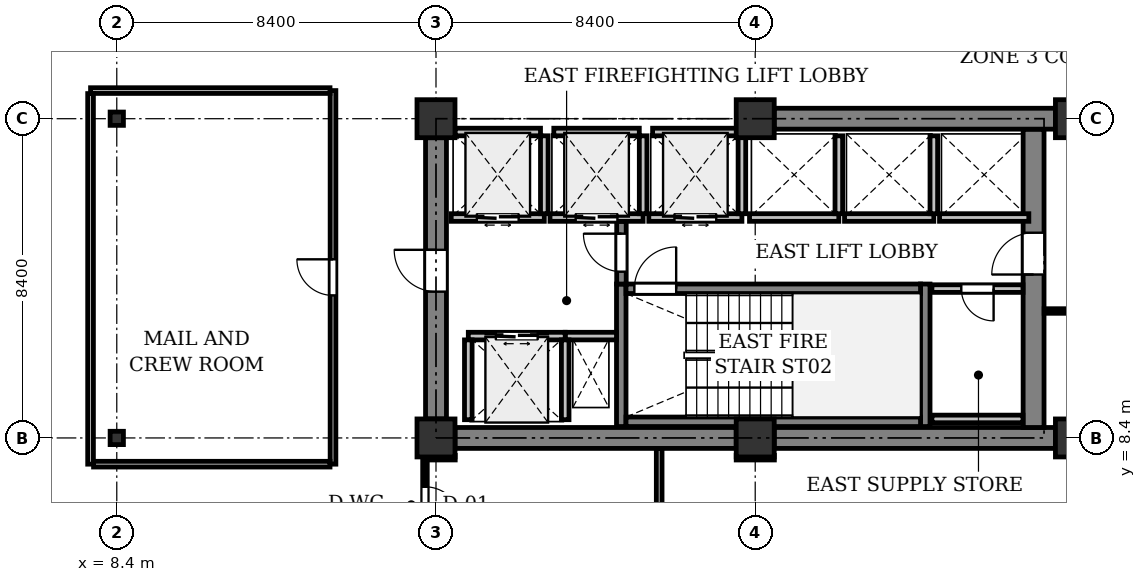
"""IFC4 building model, lengths in metres.
Left out: names, types, materials, properties, quantities, classifications, styles, units other than length and angle.
Written with IfcOpenShell. Run it as: python <this file> out.ifc"""

import sys

from ifc_helpers import new_model, si_unit, direction, frame, frame_2d, origin, origin_2d, place, context, subcontext, project, spatial, rectangle, i_section, extrude, element, fill, save


model = new_model("IFC4")
c1 = context("Model", 3, precision=1e-05, world=origin(), true_north=direction((0.0, 1.0)))
c2 = subcontext(c1, "Body", "Model", "MODEL_VIEW")
j1 = project(units=[si_unit("LENGTHUNIT", "METRE"), si_unit("PLANEANGLEUNIT", "RADIAN")], contexts=[c1])
p1 = place(None, origin())
s1 = spatial("IfcSite", under=j1, at=p1, CompositionType="ELEMENT")
p2 = place(p1, origin())
s2 = spatial("IfcBuilding", under=s1, at=p2, CompositionType="ELEMENT")
p3 = place(p2, frame((0.0, 0.0, 208.3)))
s3 = spatial("IfcBuildingStorey", under=s2, at=p3, CompositionType="ELEMENT", Elevation=208.3)
for number, where, z_axis, x_axis in (
    (1, (8.4, 8.4, 0.0), (0.0, 0.0, 1.0), (1.0, 0.0, 0.0)),
    (2, (8.4, 16.8, 0.0), (0.0, 0.0, 1.0), (1.0, 0.0, 0.0)),
):
    element("IfcColumn", number, at=place(p3, frame(where, z_axis=z_axis, x_axis=x_axis)), inside=s3, PredefinedType="COLUMN", context=c2, shape_type="SweptSolid", body=[
        extrude(i_section(OverallWidth=0.35, OverallDepth=0.35, WebThickness=0.02, FlangeThickness=0.032, at=origin_2d()), origin(), (0.0, 0.0, 1.0), 4.1),
    ])
for number, where, z_axis, x_axis in (
    (3, (16.8, 8.4, 0.0), (0.0, 0.0, 1.0), (1.0, 0.0, 0.0)),
    (4, (16.8, 16.8, 0.0), (0.0, 0.0, 1.0), (1.0, 0.0, 0.0)),
    (5, (25.2, 8.4, 0.0), (0.0, 0.0, 1.0), (1.0, 0.0, 0.0)),
    (6, (25.2, 16.8, 0.0), (0.0, 0.0, 1.0), (1.0, 0.0, 0.0)),
    (7, (33.6, 8.4, 0.0), (0.0, 0.0, 1.0), (1.0, 0.0, 0.0)),
    (8, (33.6, 16.8, 0.0), (0.0, 0.0, 1.0), (1.0, 0.0, 0.0)),
):
    element("IfcColumn", number, at=place(p3, frame(where, z_axis=z_axis, x_axis=x_axis)), inside=s3, PredefinedType="COLUMN", context=c2, shape_type="SweptSolid", body=[
        extrude(rectangle(XDim=1.0, YDim=1.0, at=origin_2d()), origin(), (0.0, 0.0, 1.0), 4.1),
    ])
p4 = place(p3, frame((17.3, 8.4, 0.0), z_axis=(0.0, 0.0, 1.0), x_axis=(1.0, 0.0, 0.0)))
e9 = element("IfcWall", 9, at=p4, inside=s3, PredefinedType="SHEAR", context=c2, shape_type="SweptSolid", body=[
    extrude(rectangle(XDim=7.4, YDim=0.55, at=frame_2d((3.7, 0.0))), origin(), (0.0, 0.0, 1.0), 3.825),
])
p5 = place(p3, frame((25.7, 8.4, 0.0), z_axis=(0.0, 0.0, 1.0), x_axis=(1.0, 0.0, 0.0)))
e10 = element("IfcWall", 10, at=p5, inside=s3, PredefinedType="SHEAR", context=c2, shape_type="SweptSolid", body=[
    extrude(rectangle(XDim=7.4, YDim=0.55, at=frame_2d((3.7, 0.0))), origin(), (0.0, 0.0, 1.0), 3.825),
])
p6 = place(p3, frame((32.525, 8.675, 0.0), z_axis=(0.0, 0.0, 1.0), x_axis=(0.0, 1.0, 0.0)))
e11 = element("IfcWall", 11, at=p6, inside=s3, PredefinedType="SHEAR", context=c2, shape_type="SweptSolid", body=[
    extrude(rectangle(XDim=7.85, YDim=0.55, at=frame_2d((3.925, 0.0))), origin(), (0.0, 0.0, 1.0), 3.825),
])
p7 = place(p6, frame((4.025, 0.0, 0.0)))
e12 = element("IfcOpeningElement", 12, at=p7, cuts=e11, PredefinedType="OPENING", context=c2, shape_type="SweptSolid", body=[
    extrude(rectangle(XDim=1.1, YDim=2.15, at=frame_2d((0.55, 1.075))), frame((0.0, 0.285, 0.0), z_axis=(0.0, -1.0, 0.0), x_axis=(1.0, 0.0, 0.0)), (0.0, 0.0, 1.0), 0.57),
])
p8 = place(p3, frame((16.8, 8.9, 0.0), z_axis=(0.0, 0.0, 1.0), x_axis=(0.0, 1.0, 0.0)))
e13 = element("IfcWall", 13, at=p8, inside=s3, PredefinedType="SHEAR", context=c2, shape_type="SweptSolid", body=[
    extrude(rectangle(XDim=7.4, YDim=0.55, at=frame_2d((3.7, 0.0))), origin(), (0.0, 0.0, 1.0), 3.825),
])
p9 = place(p8, frame((3.35, 0.0, 0.0)))
e14 = element("IfcOpeningElement", 14, at=p9, cuts=e13, PredefinedType="OPENING", context=c2, shape_type="SweptSolid", body=[
    extrude(rectangle(XDim=1.1, YDim=2.15, at=frame_2d((0.55, 1.075))), frame((0.0, 0.285, 0.0), z_axis=(0.0, -1.0, 0.0), x_axis=(1.0, 0.0, 0.0)), (0.0, 0.0, 1.0), 0.57),
])
p10 = place(p3, frame((25.7, 16.8, 0.0), z_axis=(0.0, 0.0, 1.0), x_axis=(1.0, 0.0, 0.0)))
e15 = element("IfcWall", 15, at=p10, inside=s3, PredefinedType="SHEAR", context=c2, shape_type="SweptSolid", body=[
    extrude(rectangle(XDim=7.4, YDim=0.55, at=frame_2d((3.7, 0.0))), origin(), (0.0, 0.0, 1.0), 3.825),
])
for number, where, z_axis, x_axis in (
    (16, (21.675, 8.7, 0.0), (0.0, 0.0, 1.0), (0.0, 1.0, 0.0)),
    (17, (29.675, 8.7, 0.0), (0.0, 0.0, 1.0), (0.0, 1.0, 0.0)),
):
    element("IfcWall", number, at=place(p3, frame(where, z_axis=z_axis, x_axis=x_axis)), inside=s3, PredefinedType="SHEAR", context=c2, shape_type="SweptSolid", body=[
        extrude(rectangle(XDim=3.75, YDim=0.25, at=frame_2d((1.875, 0.0))), origin(), (0.0, 0.0, 1.0), 3.825),
    ])
p11 = place(p3, frame((21.8, 8.825, 0.0), z_axis=(0.0, 0.0, 1.0), x_axis=(1.0, 0.0, 0.0)))
e18 = element("IfcWall", 18, at=p11, inside=s3, PredefinedType="SHEAR", context=c2, shape_type="SweptSolid", body=[
    extrude(rectangle(XDim=7.75, YDim=0.25, at=frame_2d((3.875, 0.0))), origin(), (0.0, 0.0, 1.0), 3.825),
])
p12 = place(p3, frame((21.8, 12.325, 0.0), z_axis=(0.0, 0.0, 1.0), x_axis=(1.0, 0.0, 0.0)))
e19 = element("IfcWall", 19, at=p12, inside=s3, PredefinedType="SHEAR", context=c2, shape_type="SweptSolid", body=[
    extrude(rectangle(XDim=7.75, YDim=0.25, at=frame_2d((3.875, 0.0))), origin(), (0.0, 0.0, 1.0), 3.825),
])
p13 = place(p12, frame((0.22, 0.0, 0.0)))
e20 = element("IfcOpeningElement", 20, at=p13, cuts=e19, PredefinedType="OPENING", context=c2, shape_type="SweptSolid", body=[
    extrude(rectangle(XDim=1.1, YDim=2.15, at=frame_2d((0.55, 1.075))), frame((0.0, 0.135, 0.0), z_axis=(0.0, -1.0, 0.0), x_axis=(1.0, 0.0, 0.0)), (0.0, 0.0, 1.0), 0.27),
])
p14 = place(p3, frame((20.2, 11.08, 0.0), z_axis=(0.0, 0.0, 1.0), x_axis=(1.0, 0.0, 0.0)))
e21 = element("IfcWall", 21, at=p14, inside=s3, PredefinedType="PARTITIONING", context=c2, shape_type="SweptSolid", body=[
    extrude(rectangle(XDim=1.35, YDim=0.2, at=frame_2d((0.675, 0.0))), origin(), (0.0, 0.0, 1.0), 3.825),
])
p15 = place(p3, frame((21.68, 12.45, 0.0), z_axis=(0.0, 0.0, 1.0), x_axis=(0.0, 1.0, 0.0)))
e22 = element("IfcWall", 22, at=p15, inside=s3, PredefinedType="SHEAR", context=c2, shape_type="SweptSolid", body=[
    extrude(rectangle(XDim=1.65, YDim=0.25, at=frame_2d((0.825, 0.0))), origin(), (0.0, 0.0, 1.0), 3.825),
])
p16 = place(p15, frame((0.325, 0.0, 0.0)))
e23 = element("IfcOpeningElement", 23, at=p16, cuts=e22, PredefinedType="OPENING", context=c2, shape_type="SweptSolid", body=[
    extrude(rectangle(XDim=1.0, YDim=2.15, at=frame_2d((0.5, 1.075))), frame((0.0, 0.135, 0.0), z_axis=(0.0, -1.0, 0.0), x_axis=(1.0, 0.0, 0.0)), (0.0, 0.0, 1.0), 0.27),
])
p17 = place(p3, frame((17.65, 11.08, 0.0), z_axis=(0.0, 0.0, 1.0), x_axis=(1.0, 0.0, 0.0)))
e24 = element("IfcWall", 24, at=p17, inside=s3, PredefinedType="PARTITIONING", context=c2, shape_type="SweptSolid", body=[
    extrude(rectangle(XDim=2.55, YDim=0.2, at=frame_2d((1.275, 0.0))), origin(), (0.0, 0.0, 1.0), 3.825),
])
p18 = place(p17, frame((0.725, 0.0, 0.0)))
e25 = element("IfcOpeningElement", 25, at=p18, cuts=e24, PredefinedType="OPENING", context=c2, shape_type="SweptSolid", body=[
    extrude(rectangle(XDim=1.1, YDim=2.2, at=frame_2d((0.55, 1.1))), frame((0.0, 0.11, 0.0), z_axis=(0.0, -1.0, 0.0), x_axis=(1.0, 0.0, 0.0)), (0.0, 0.0, 1.0), 0.22),
])
for number, where, z_axis, x_axis in (
    (26, (20.2, 8.88, 0.0), (0.0, 0.0, 1.0), (0.0, 1.0, 0.0)),
    (27, (17.65, 8.88, 0.0), (0.0, 0.0, 1.0), (0.0, 1.0, 0.0)),
):
    element("IfcWall", number, at=place(p3, frame(where, z_axis=z_axis, x_axis=x_axis)), inside=s3, PredefinedType="PARTITIONING", context=c2, shape_type="SweptSolid", body=[
        extrude(rectangle(XDim=2.1, YDim=0.2, at=frame_2d((1.05, 0.0))), origin(), (0.0, 0.0, 1.0), 3.825),
    ])
p19 = place(p3, frame((17.2, 14.2, 0.0), z_axis=(0.0, 0.0, 1.0), x_axis=(1.0, 0.0, 0.0)))
e28 = element("IfcWall", 28, at=p19, inside=s3, PredefinedType="PARTITIONING", context=c2, shape_type="SweptSolid", body=[
    extrude(rectangle(XDim=2.45, YDim=0.2, at=frame_2d((1.225, 0.0))), origin(), (0.0, 0.0, 1.0), 3.825),
])
p20 = place(p19, frame((0.675, 0.0, 0.0)))
e29 = element("IfcOpeningElement", 29, at=p20, cuts=e28, PredefinedType="OPENING", context=c2, shape_type="SweptSolid", body=[
    extrude(rectangle(XDim=1.1, YDim=2.2, at=frame_2d((0.55, 1.1))), frame((0.0, 0.11, 0.0), z_axis=(0.0, -1.0, 0.0), x_axis=(1.0, 0.0, 0.0)), (0.0, 0.0, 1.0), 0.22),
])
p21 = place(p3, frame((19.65, 14.3, 0.0), z_axis=(0.0, 0.0, 1.0), x_axis=(0.0, 1.0, 0.0)))
e30 = element("IfcWall", 30, at=p21, inside=s3, PredefinedType="PARTITIONING", context=c2, shape_type="SweptSolid", body=[
    extrude(rectangle(XDim=2.05, YDim=0.2, at=frame_2d((1.025, 0.0))), origin(), (0.0, 0.0, 1.0), 3.825),
])
p22 = place(p3, frame((17.3, 16.45, 0.0), z_axis=(0.0, 0.0, 1.0), x_axis=(1.0, 0.0, 0.0)))
e31 = element("IfcWall", 31, at=p22, inside=s3, PredefinedType="PARTITIONING", context=c2, shape_type="SweptSolid", body=[
    extrude(rectangle(XDim=2.25, YDim=0.2, at=frame_2d((1.125, 0.0))), origin(), (0.0, 0.0, 1.0), 3.825),
])
p23 = place(p3, frame((19.8, 14.2, 0.0), z_axis=(0.0, 0.0, 1.0), x_axis=(1.0, 0.0, 0.0)))
e32 = element("IfcWall", 32, at=p23, inside=s3, PredefinedType="PARTITIONING", context=c2, shape_type="SweptSolid", body=[
    extrude(rectangle(XDim=2.45, YDim=0.2, at=frame_2d((1.225, 0.0))), origin(), (0.0, 0.0, 1.0), 3.825),
])
p24 = place(p23, frame((0.675, 0.0, 0.0)))
e33 = element("IfcOpeningElement", 33, at=p24, cuts=e32, PredefinedType="OPENING", context=c2, shape_type="SweptSolid", body=[
    extrude(rectangle(XDim=1.1, YDim=2.2, at=frame_2d((0.55, 1.1))), frame((0.0, 0.11, 0.0), z_axis=(0.0, -1.0, 0.0), x_axis=(1.0, 0.0, 0.0)), (0.0, 0.0, 1.0), 0.22),
])
p25 = place(p3, frame((22.25, 14.3, 0.0), z_axis=(0.0, 0.0, 1.0), x_axis=(0.0, 1.0, 0.0)))
e34 = element("IfcWall", 34, at=p25, inside=s3, PredefinedType="PARTITIONING", context=c2, shape_type="SweptSolid", body=[
    extrude(rectangle(XDim=2.05, YDim=0.2, at=frame_2d((1.025, 0.0))), origin(), (0.0, 0.0, 1.0), 3.825),
])
p26 = place(p3, frame((19.9, 16.45, 0.0), z_axis=(0.0, 0.0, 1.0), x_axis=(1.0, 0.0, 0.0)))
e35 = element("IfcWall", 35, at=p26, inside=s3, PredefinedType="PARTITIONING", context=c2, shape_type="SweptSolid", body=[
    extrude(rectangle(XDim=2.25, YDim=0.2, at=frame_2d((1.125, 0.0))), origin(), (0.0, 0.0, 1.0), 3.825),
])
p27 = place(p3, frame((22.4, 14.2, 0.0), z_axis=(0.0, 0.0, 1.0), x_axis=(1.0, 0.0, 0.0)))
e36 = element("IfcWall", 36, at=p27, inside=s3, PredefinedType="PARTITIONING", context=c2, shape_type="SweptSolid", body=[
    extrude(rectangle(XDim=2.45, YDim=0.2, at=frame_2d((1.225, 0.0))), origin(), (0.0, 0.0, 1.0), 3.825),
])
p28 = place(p27, frame((0.675, 0.0, 0.0)))
e37 = element("IfcOpeningElement", 37, at=p28, cuts=e36, PredefinedType="OPENING", context=c2, shape_type="SweptSolid", body=[
    extrude(rectangle(XDim=1.1, YDim=2.2, at=frame_2d((0.55, 1.1))), frame((0.0, 0.11, 0.0), z_axis=(0.0, -1.0, 0.0), x_axis=(1.0, 0.0, 0.0)), (0.0, 0.0, 1.0), 0.22),
])
p29 = place(p3, frame((24.85, 14.3, 0.0), z_axis=(0.0, 0.0, 1.0), x_axis=(0.0, 1.0, 0.0)))
e38 = element("IfcWall", 38, at=p29, inside=s3, PredefinedType="PARTITIONING", context=c2, shape_type="SweptSolid", body=[
    extrude(rectangle(XDim=2.05, YDim=0.2, at=frame_2d((1.025, 0.0))), origin(), (0.0, 0.0, 1.0), 3.825),
])
p30 = place(p3, frame((22.5, 16.45, 0.0), z_axis=(0.0, 0.0, 1.0), x_axis=(1.0, 0.0, 0.0)))
e39 = element("IfcWall", 39, at=p30, inside=s3, PredefinedType="PARTITIONING", context=c2, shape_type="SweptSolid", body=[
    extrude(rectangle(XDim=2.25, YDim=0.2, at=frame_2d((1.125, 0.0))), origin(), (0.0, 0.0, 1.0), 3.825),
])
p31 = place(p3, frame((25.05, 14.2, 0.0), z_axis=(0.0, 0.0, 1.0), x_axis=(1.0, 0.0, 0.0)))
e40 = element("IfcWall", 40, at=p31, inside=s3, PredefinedType="PARTITIONING", context=c2, shape_type="SweptSolid", body=[
    extrude(rectangle(XDim=2.35, YDim=0.2, at=frame_2d((1.175, 0.0))), origin(), (0.0, 0.0, 1.0), 3.825),
])
p32 = place(p3, frame((27.4, 14.3, 0.0), z_axis=(0.0, 0.0, 1.0), x_axis=(0.0, 1.0, 0.0)))
e41 = element("IfcWall", 41, at=p32, inside=s3, PredefinedType="PARTITIONING", context=c2, shape_type="SweptSolid", body=[
    extrude(rectangle(XDim=2.05, YDim=0.2, at=frame_2d((1.025, 0.0))), origin(), (0.0, 0.0, 1.0), 3.825),
])
p33 = place(p3, frame((27.55, 14.2, 0.0), z_axis=(0.0, 0.0, 1.0), x_axis=(1.0, 0.0, 0.0)))
e42 = element("IfcWall", 42, at=p33, inside=s3, PredefinedType="PARTITIONING", context=c2, shape_type="SweptSolid", body=[
    extrude(rectangle(XDim=2.35, YDim=0.2, at=frame_2d((1.175, 0.0))), origin(), (0.0, 0.0, 1.0), 3.825),
])
p34 = place(p3, frame((29.9, 14.3, 0.0), z_axis=(0.0, 0.0, 1.0), x_axis=(0.0, 1.0, 0.0)))
e43 = element("IfcWall", 43, at=p34, inside=s3, PredefinedType="PARTITIONING", context=c2, shape_type="SweptSolid", body=[
    extrude(rectangle(XDim=2.05, YDim=0.2, at=frame_2d((1.025, 0.0))), origin(), (0.0, 0.0, 1.0), 3.825),
])
p35 = place(p3, frame((30.05, 14.2, 0.0), z_axis=(0.0, 0.0, 1.0), x_axis=(1.0, 0.0, 0.0)))
e44 = element("IfcWall", 44, at=p35, inside=s3, PredefinedType="PARTITIONING", context=c2, shape_type="SweptSolid", body=[
    extrude(rectangle(XDim=2.35, YDim=0.2, at=frame_2d((1.175, 0.0))), origin(), (0.0, 0.0, 1.0), 3.825),
])
p36 = place(p3, frame((32.246, 12.33, 0.0), z_axis=(0.0, 0.0, 1.0), x_axis=(-1.0, 0.0, 0.0)))
e45 = element("IfcWall", 45, at=p36, inside=s3, PredefinedType="PARTITIONING", context=c2, shape_type="SweptSolid", body=[
    extrude(rectangle(XDim=2.396, YDim=0.2, at=frame_2d((1.198, 0.0))), origin(), (0.0, 0.0, 1.0), 3.825),
])
p37 = place(p36, frame((0.773, 0.0, 0.0)))
e46 = element("IfcOpeningElement", 46, at=p37, cuts=e45, PredefinedType="OPENING", context=c2, shape_type="SweptSolid", body=[
    extrude(rectangle(XDim=0.85, YDim=2.15, at=frame_2d((0.425, 1.075))), frame((0.0, 0.11, 0.0), z_axis=(0.0, -1.0, 0.0), x_axis=(1.0, 0.0, 0.0)), (0.0, 0.0, 1.0), 0.22),
])
p38 = place(p3, frame((29.85, 8.9, 0.0), z_axis=(0.0, 0.0, 1.0), x_axis=(1.0, 0.0, 0.0)))
e47 = element("IfcWall", 47, at=p38, inside=s3, PredefinedType="PARTITIONING", context=c2, shape_type="SweptSolid", body=[
    extrude(rectangle(XDim=2.396, YDim=0.2, at=frame_2d((1.198, 0.0))), origin(), (0.0, 0.0, 1.0), 3.825),
])
p39 = place(p3, frame((22.673, 0.169, 0.0), z_axis=(0.0, 0.0, 1.0), x_axis=(0.0, 1.0, 0.0)))
e48 = element("IfcWall", 48, at=p39, inside=s3, PredefinedType="PARTITIONING", context=c2, shape_type="SweptSolid", body=[
    extrude(rectangle(XDim=7.952, YDim=0.15, at=frame_2d((3.976, 0.0))), origin(), (0.0, 0.0, 1.0), 3.825),
])
p40 = place(p3, frame((17.306, 7.881, 0.0), z_axis=(0.0, 0.0, 1.0), x_axis=(-0.999999247244, -0.001226992941, 0.0)))
e49 = element("IfcWall", 49, at=p40, inside=s3, PredefinedType="PARTITIONING", context=c2, shape_type="SweptSolid", body=[
    extrude(rectangle(XDim=0.796, YDim=0.12, at=frame_2d((0.398, 0.0))), origin(), (0.0, 0.0, 1.0), 3.371),
])
p41 = place(p3, frame((16.51, 7.88, 0.0), z_axis=(0.0, 0.0, 1.0), x_axis=(0.0, -1.0, 0.0)))
e50 = element("IfcWall", 50, at=p41, inside=s3, PredefinedType="PARTITIONING", context=c2, shape_type="SweptSolid", body=[
    extrude(rectangle(XDim=2.48, YDim=0.12, at=frame_2d((1.24, 0.0))), origin(), (0.0, 0.0, 1.0), 3.825),
])
p42 = place(p41, frame((0.765, 0.0, 0.0)))
e51 = element("IfcOpeningElement", 51, at=p42, cuts=e50, PredefinedType="OPENING", context=c2, shape_type="SweptSolid", body=[
    extrude(rectangle(XDim=0.95, YDim=2.15, at=frame_2d((0.475, 1.075))), frame((0.0, 0.07, 0.0), z_axis=(0.0, -1.0, 0.0), x_axis=(1.0, 0.0, 0.0)), (0.0, 0.0, 1.0), 0.14),
])
p43 = place(p3, frame((14.09, 7.71, 0.0), z_axis=(0.0, 0.0, 1.0), x_axis=(0.0, 1.0, 0.0)))
e52 = element("IfcWall", 52, at=p43, inside=s3, PredefinedType="PARTITIONING", context=c2, shape_type="SweptSolid", body=[
    extrude(rectangle(XDim=9.83, YDim=0.15, at=frame_2d((4.915, 0.0))), origin(), (0.0, 0.0, 1.0), 3.365),
])
p44 = place(p43, frame((4.44, 0.0, 0.0)))
e53 = element("IfcOpeningElement", 53, at=p44, cuts=e52, PredefinedType="OPENING", context=c2, shape_type="SweptSolid", body=[
    extrude(rectangle(XDim=0.95, YDim=2.15, at=frame_2d((0.475, 1.075))), frame((0.0, 0.085, 0.0), z_axis=(0.0, -1.0, 0.0), x_axis=(1.0, 0.0, 0.0)), (0.0, 0.0, 1.0), 0.17),
])
p45 = place(p3, frame((14.011, 17.54, 0.0), z_axis=(0.0, 0.0, 1.0), x_axis=(-1.0, 0.0, 0.0)))
e54 = element("IfcWall", 54, at=p45, inside=s3, PredefinedType="PARTITIONING", context=c2, shape_type="SweptSolid", body=[
    extrude(rectangle(XDim=6.301, YDim=0.15, at=frame_2d((3.15, 0.0))), origin(), (0.0, 0.0, 1.0), 3.371),
])
p46 = place(p3, frame((7.71, 17.461, 0.0), z_axis=(0.0, 0.0, 1.0), x_axis=(0.0, -1.0, 0.0)))
e55 = element("IfcWall", 55, at=p46, inside=s3, PredefinedType="PARTITIONING", context=c2, shape_type="SweptSolid", body=[
    extrude(rectangle(XDim=9.751, YDim=0.15, at=frame_2d((4.875, 0.0))), origin(), (0.0, 0.0, 1.0), 3.213),
])
p47 = place(p3, frame((7.789, 7.71, 0.0), z_axis=(0.0, 0.0, 1.0), x_axis=(1.0, 0.0, 0.0)))
e56 = element("IfcWall", 56, at=p47, inside=s3, PredefinedType="PARTITIONING", context=c2, shape_type="SweptSolid", body=[
    extrude(rectangle(XDim=6.222, YDim=0.15, at=frame_2d((3.111, 0.0))), origin(), (0.0, 0.0, 1.0), 3.371),
])
p48 = place(p3, frame((34.261, 11.74, 0.0), z_axis=(0.0, 0.0, 1.0), x_axis=(-1.0, 0.0, 0.0)))
e57 = element("IfcWall", 57, at=p48, inside=s3, PredefinedType="PARTITIONING", context=c2, shape_type="SweptSolid", body=[
    extrude(rectangle(XDim=1.457, YDim=0.12, at=frame_2d((0.729, 0.0))), origin(), (0.0, 0.0, 1.0), 3.371),
])
p49 = place(p3, frame((25.704, 7.88, 0.0), z_axis=(0.0, 0.0, 1.0), x_axis=(-0.999999881717, -0.000486381265, 0.0)))
e58 = element("IfcWall", 58, at=p49, inside=s3, PredefinedType="PARTITIONING", context=c2, shape_type="SweptSolid", body=[
    extrude(rectangle(XDim=1.004, YDim=0.12, at=frame_2d((0.502, 0.0))), origin(), (0.0, 0.0, 1.0), 3.371),
])
p50 = place(p7, origin())
e59 = element("IfcDoor", 59, at=p50, inside=s3, OperationType="SINGLE_SWING_LEFT", PredefinedType="DOOR", context=c2, shape_type="SweptSolid", body=[
    extrude(rectangle(XDim=1.1, YDim=2.15, at=frame_2d((0.55, 1.075))), frame((0.0, 0.025, 0.0), z_axis=(0.0, -1.0, 0.0), x_axis=(1.0, 0.0, 0.0)), (0.0, 0.0, 1.0), 0.05),
])
fill(e12, e59)
p51 = place(p9, origin())
e60 = element("IfcDoor", 60, at=p51, inside=s3, OperationType="SINGLE_SWING_RIGHT", PredefinedType="DOOR", context=c2, shape_type="SweptSolid", body=[
    extrude(rectangle(XDim=1.1, YDim=2.15, at=frame_2d((0.55, 1.075))), frame((0.0, 0.025, 0.0), z_axis=(0.0, -1.0, 0.0), x_axis=(1.0, 0.0, 0.0)), (0.0, 0.0, 1.0), 0.05),
])
fill(e14, e60)
p52 = place(p13, origin())
e61 = element("IfcDoor", 61, at=p52, inside=s3, OperationType="SINGLE_SWING_RIGHT", PredefinedType="DOOR", context=c2, shape_type="SweptSolid", body=[
    extrude(rectangle(XDim=1.1, YDim=2.15, at=frame_2d((0.55, 1.075))), frame((0.0, 0.025, 0.0), z_axis=(0.0, -1.0, 0.0), x_axis=(1.0, 0.0, 0.0)), (0.0, 0.0, 1.0), 0.05),
])
fill(e20, e61)
p53 = place(p16, origin())
e62 = element("IfcDoor", 62, at=p53, inside=s3, OperationType="SINGLE_SWING_RIGHT", PredefinedType="DOOR", context=c2, shape_type="SweptSolid", body=[
    extrude(rectangle(XDim=1.0, YDim=2.15, at=frame_2d((0.5, 1.075))), frame((0.0, 0.025, 0.0), z_axis=(0.0, -1.0, 0.0), x_axis=(1.0, 0.0, 0.0)), (0.0, 0.0, 1.0), 0.05),
])
fill(e23, e62)
p54 = place(p18, origin())
e63 = element("IfcDoor", 63, at=p54, inside=s3, OperationType="DOUBLE_DOOR_SLIDING", PredefinedType="DOOR", context=c2, shape_type="SweptSolid", body=[
    extrude(rectangle(XDim=1.1, YDim=2.2, at=frame_2d((0.55, 1.1))), frame((0.0, 0.025, 0.0), z_axis=(0.0, -1.0, 0.0), x_axis=(1.0, 0.0, 0.0)), (0.0, 0.0, 1.0), 0.05),
])
fill(e25, e63)
p55 = place(p20, origin())
e64 = element("IfcDoor", 64, at=p55, inside=s3, OperationType="DOUBLE_DOOR_SLIDING", PredefinedType="DOOR", context=c2, shape_type="SweptSolid", body=[
    extrude(rectangle(XDim=1.1, YDim=2.2, at=frame_2d((0.55, 1.1))), frame((0.0, 0.025, 0.0), z_axis=(0.0, -1.0, 0.0), x_axis=(1.0, 0.0, 0.0)), (0.0, 0.0, 1.0), 0.05),
])
fill(e29, e64)
p56 = place(p24, origin())
e65 = element("IfcDoor", 65, at=p56, inside=s3, OperationType="DOUBLE_DOOR_SLIDING", PredefinedType="DOOR", context=c2, shape_type="SweptSolid", body=[
    extrude(rectangle(XDim=1.1, YDim=2.2, at=frame_2d((0.55, 1.1))), frame((0.0, 0.025, 0.0), z_axis=(0.0, -1.0, 0.0), x_axis=(1.0, 0.0, 0.0)), (0.0, 0.0, 1.0), 0.05),
])
fill(e33, e65)
p57 = place(p28, origin())
e66 = element("IfcDoor", 66, at=p57, inside=s3, OperationType="DOUBLE_DOOR_SLIDING", PredefinedType="DOOR", context=c2, shape_type="SweptSolid", body=[
    extrude(rectangle(XDim=1.1, YDim=2.2, at=frame_2d((0.55, 1.1))), frame((0.0, 0.025, 0.0), z_axis=(0.0, -1.0, 0.0), x_axis=(1.0, 0.0, 0.0)), (0.0, 0.0, 1.0), 0.05),
])
fill(e37, e66)
p58 = place(p37, origin())
e67 = element("IfcDoor", 67, at=p58, inside=s3, OperationType="SINGLE_SWING_LEFT", PredefinedType="DOOR", context=c2, shape_type="SweptSolid", body=[
    extrude(rectangle(XDim=0.85, YDim=2.15, at=frame_2d((0.425, 1.075))), frame((0.0, 0.025, 0.0), z_axis=(0.0, -1.0, 0.0), x_axis=(1.0, 0.0, 0.0)), (0.0, 0.0, 1.0), 0.05),
])
fill(e46, e67)
p59 = place(p42, origin())
e68 = element("IfcDoor", 68, at=p59, inside=s3, OperationType="SINGLE_SWING_RIGHT", PredefinedType="DOOR", context=c2, shape_type="SweptSolid", body=[
    extrude(rectangle(XDim=0.95, YDim=2.15, at=frame_2d((0.475, 1.075))), frame((0.0, 0.025, 0.0), z_axis=(0.0, -1.0, 0.0), x_axis=(1.0, 0.0, 0.0)), (0.0, 0.0, 1.0), 0.05),
])
fill(e51, e68)
p60 = place(p44, origin())
e69 = element("IfcDoor", 69, at=p60, inside=s3, OperationType="SINGLE_SWING_RIGHT", PredefinedType="DOOR", context=c2, shape_type="SweptSolid", body=[
    extrude(rectangle(XDim=0.95, YDim=2.15, at=frame_2d((0.475, 1.075))), frame((0.0, 0.025, 0.0), z_axis=(0.0, -1.0, 0.0), x_axis=(1.0, 0.0, 0.0)), (0.0, 0.0, 1.0), 0.05),
])
fill(e53, e69)
save(model, sys.argv[1])
